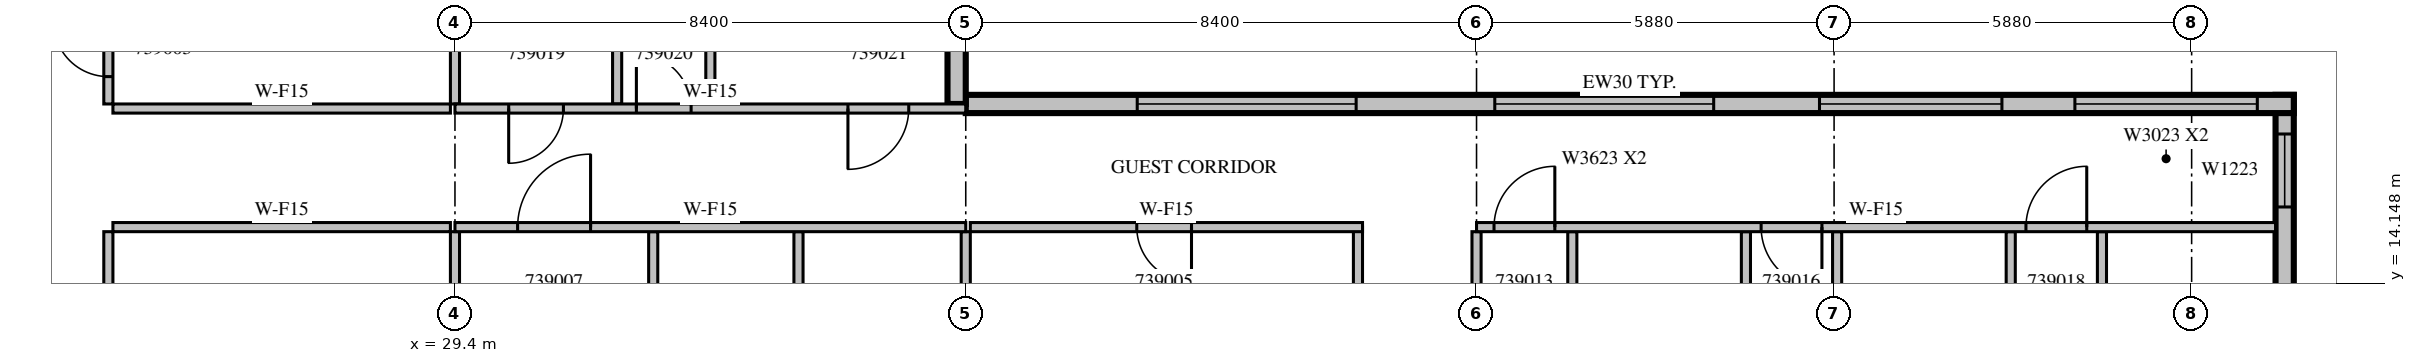
"""IFC4 building model, lengths in metres.
Left out: names, types, materials, properties, quantities, classifications, styles, units other than length and angle.
Written with IfcOpenShell. Run it as: python <this file> out.ifc"""

import sys

from ifc_helpers import new_model, si_unit, direction, frame, frame_2d, origin, place, context, subcontext, project, spatial, rectangle, extrude, source, transform, mapped, element, fill, save


model = new_model("IFC4")
c1 = context("Model", 3, precision=1e-05, world=origin(), true_north=direction((0.0, 1.0)))
c2 = subcontext(c1, "Body", "Model", "MODEL_VIEW")
j1 = project(units=[si_unit("LENGTHUNIT", "METRE"), si_unit("PLANEANGLEUNIT", "RADIAN")], contexts=[c1])
p1 = place(None, origin())
s1 = spatial("IfcSite", under=j1, at=p1, CompositionType="ELEMENT")
p2 = place(p1, origin())
s2 = spatial("IfcBuilding", under=s1, at=p2, CompositionType="ELEMENT")
p3 = place(p2, frame((0.0, 0.0, 181.6)))
s3 = spatial("IfcBuildingStorey", under=s2, at=p3, CompositionType="ELEMENT", Elevation=181.6)
m1 = source(origin(), c2, "Body", "SweptSolid", [
    extrude(rectangle(XDim=3.375, YDim=0.3, at=frame_2d((1.688, 0.0))), origin(), (0.0, 0.0, 1.0), 3.4),
])
p4 = place(p3, frame((59.49, 13.875, 0.0), z_axis=(0.0, 0.0, 1.0), x_axis=(0.0, 1.0, 0.0)))
e1 = element("IfcWall", 1, at=p4, inside=s3, PredefinedType="STANDARD", context=c2, shape_type="MappedRepresentation", body=[
    mapped(m1, transform((0.0, 0.0, 0.0), scale=1.0)),
])
m2 = source(origin(), c2, "Body", "SweptSolid", [
    extrude(rectangle(XDim=1.2, YDim=2.3, at=frame_2d((0.6, 1.15))), frame((0.0, 0.16, 0.0), z_axis=(0.0, -1.0, 0.0), x_axis=(1.0, 0.0, 0.0)), (0.0, 0.0, 1.0), 0.32),
])
p5 = place(p4, frame((1.531, 0.0, 0.6)))
e2 = element("IfcOpeningElement", 2, at=p5, cuts=e1, PredefinedType="OPENING", context=c2, shape_type="MappedRepresentation", body=[
    mapped(m2, transform((0.0, 0.0, 0.0), scale=1.0)),
])
m3 = source(origin(), c2, "Body", "SweptSolid", [
    extrude(rectangle(XDim=21.84, YDim=0.3, at=frame_2d((10.92, 0.0))), origin(), (0.0, 0.0, 1.0), 3.4),
])
p6 = place(p3, frame((59.64, 17.1, 0.0), z_axis=(0.0, 0.0, 1.0), x_axis=(-1.0, 0.0, 0.0)))
e3 = element("IfcWall", 3, at=p6, inside=s3, PredefinedType="STANDARD", context=c2, shape_type="MappedRepresentation", body=[
    mapped(m3, transform((0.0, 0.0, 0.0), scale=1.0)),
])
m4 = source(origin(), c2, "Body", "SweptSolid", [
    extrude(rectangle(XDim=3.0, YDim=2.3, at=frame_2d((1.5, 1.15))), frame((0.0, 0.16, 0.0), z_axis=(0.0, -1.0, 0.0), x_axis=(1.0, 0.0, 0.0)), (0.0, 0.0, 1.0), 0.32),
])
p7 = place(p6, frame((0.6, 0.0, 0.6)))
e4 = element("IfcOpeningElement", 4, at=p7, cuts=e3, PredefinedType="OPENING", context=c2, shape_type="MappedRepresentation", body=[
    mapped(m4, transform((0.0, 0.0, 0.0), scale=1.0)),
])
p8 = place(p6, frame((4.8, 0.0, 0.6)))
e5 = element("IfcOpeningElement", 5, at=p8, cuts=e3, PredefinedType="OPENING", context=c2, shape_type="MappedRepresentation", body=[
    mapped(m4, transform((0.0, 0.0, 0.0), scale=1.0)),
])
m5 = source(origin(), c2, "Body", "SweptSolid", [
    extrude(rectangle(XDim=3.6, YDim=2.3, at=frame_2d((1.8, 1.15))), frame((0.0, 0.16, 0.0), z_axis=(0.0, -1.0, 0.0), x_axis=(1.0, 0.0, 0.0)), (0.0, 0.0, 1.0), 0.32),
])
p9 = place(p6, frame((9.54, 0.0, 0.6)))
e6 = element("IfcOpeningElement", 6, at=p9, cuts=e3, PredefinedType="OPENING", context=c2, shape_type="MappedRepresentation", body=[
    mapped(m5, transform((0.0, 0.0, 0.0), scale=1.0)),
])
p10 = place(p6, frame((15.42, 0.0, 0.6)))
e7 = element("IfcOpeningElement", 7, at=p10, cuts=e3, PredefinedType="OPENING", context=c2, shape_type="MappedRepresentation", body=[
    mapped(m5, transform((0.0, 0.0, 0.0), scale=1.0)),
])
m6 = source(origin(), c2, "Body", "SweptSolid", [
    extrude(rectangle(XDim=3.0, YDim=0.3, at=frame_2d((1.5, 0.0))), origin(), (0.0, 0.0, 1.0), 3.4),
])
p11 = place(p3, frame((37.65, 17.1, 0.0), z_axis=(0.0, 0.0, 1.0), x_axis=(0.0, 1.0, 0.0)))
e8 = element("IfcWall", 8, at=p11, inside=s3, PredefinedType="STANDARD", context=c2, shape_type="MappedRepresentation", body=[
    mapped(m6, transform((0.0, 0.0, 0.0), scale=1.0)),
])
p12 = place(p11, frame((1.425, 0.0, 0.6)))
e9 = element("IfcOpeningElement", 9, at=p12, cuts=e8, PredefinedType="OPENING", context=c2, shape_type="MappedRepresentation", body=[
    mapped(m2, transform((0.0, 0.0, 0.0), scale=1.0)),
])
p13 = place(p3, frame((23.7, 15.0, 0.0), z_axis=(0.0, 0.0, 1.0), x_axis=(0.0, -1.0, 0.0)))
e10 = element("IfcWall", 10, at=p13, inside=s3, PredefinedType="PARTITIONING", context=c2, shape_type="SweptSolid", body=[
    extrude(rectangle(XDim=11.525, YDim=0.15, at=frame_2d((5.763, 0.0))), origin(), (0.0, 0.0, 1.0), 3.4),
])
m7 = source(origin(), c2, "Body", "SweptSolid", [
    extrude(rectangle(XDim=0.9, YDim=2.1, at=frame_2d((0.45, 1.05))), frame((0.0, 0.085, 0.0), z_axis=(0.0, -1.0, 0.0), x_axis=(1.0, 0.0, 0.0)), (0.0, 0.0, 1.0), 0.17),
])
p14 = place(p13, frame((9.363, 0.0, 0.0)))
e11 = element("IfcOpeningElement", 11, at=p14, cuts=e10, PredefinedType="OPENING", context=c2, shape_type="MappedRepresentation", body=[
    mapped(m7, transform((0.0, 0.0, 0.0), scale=1.0)),
])
p15 = place(p13, frame((2.725, 0.0, 0.0)))
e12 = element("IfcOpeningElement", 12, at=p15, cuts=e10, PredefinedType="OPENING", context=c2, shape_type="MappedRepresentation", body=[
    mapped(m7, transform((0.0, 0.0, 0.0), scale=1.0)),
])
m8 = source(origin(), c2, "Body", "SweptSolid", [
    extrude(rectangle(XDim=3.6, YDim=0.15, at=frame_2d((1.8, 0.0))), origin(), (0.0, 0.0, 1.0), 3.4),
])
p16 = place(p3, frame((23.7, 20.7, 0.0), z_axis=(0.0, 0.0, 1.0), x_axis=(0.0, -1.0, 0.0)))
e13 = element("IfcWall", 13, at=p16, inside=s3, PredefinedType="PARTITIONING", context=c2, shape_type="MappedRepresentation", body=[
    mapped(m8, transform((0.0, 0.0, 0.0), scale=1.0)),
])
p17 = place(p16, frame((2.25, 0.0, 0.0)))
e14 = element("IfcOpeningElement", 14, at=p17, cuts=e13, PredefinedType="OPENING", context=c2, shape_type="MappedRepresentation", body=[
    mapped(m7, transform((0.0, 0.0, 0.0), scale=1.0)),
])
m9 = source(origin(), c2, "Body", "SweptSolid", [
    extrude(rectangle(XDim=5.55, YDim=0.15, at=frame_2d((2.775, 0.0))), origin(), (0.0, 0.0, 1.0), 3.4),
])
for number, where, z_axis, x_axis in (
    (15, (29.325, 15.075, 0.0), (0.0, 0.0, 1.0), (-1.0, 0.0, 0.0)),
    (16, (23.775, 17.025, 0.0), (0.0, 0.0, 1.0), (1.0, 0.0, 0.0)),
):
    element("IfcWall", number, at=place(p3, frame(where, z_axis=z_axis, x_axis=x_axis)), inside=s3, PredefinedType="PARTITIONING", context=c2, shape_type="MappedRepresentation", body=[
        mapped(m9, transform((0.0, 0.0, 0.0), scale=1.0)),
    ])
m10 = source(origin(), c2, "Body", "SweptSolid", [
    extrude(rectangle(XDim=4.051, YDim=0.15, at=frame_2d((2.026, 0.0))), origin(), (0.0, 0.0, 1.0), 3.4),
])
p18 = place(p3, frame((29.4, 10.949, 0.0), z_axis=(0.0, 0.0, 1.0), x_axis=(0.0, 1.0, 0.0)))
e17 = element("IfcWall", 17, at=p18, inside=s3, PredefinedType="PARTITIONING", context=c2, shape_type="MappedRepresentation", body=[
    mapped(m10, transform((0.0, 0.0, 0.0), scale=1.0)),
])
m11 = source(origin(), c2, "Body", "SweptSolid", [
    extrude(rectangle(XDim=3.001, YDim=0.15, at=frame_2d((1.5, 0.0))), origin(), (0.0, 0.0, 1.0), 3.4),
])
p19 = place(p3, frame((29.4, 17.1, 0.0), z_axis=(0.0, 0.0, 1.0), x_axis=(0.0, 1.0, 0.0)))
e18 = element("IfcWall", 18, at=p19, inside=s3, PredefinedType="PARTITIONING", context=c2, shape_type="MappedRepresentation", body=[
    mapped(m11, transform((0.0, 0.0, 0.0), scale=1.0)),
])
m12 = source(origin(), c2, "Body", "SweptSolid", [
    extrude(rectangle(XDim=3.975, YDim=0.15, at=frame_2d((1.988, 0.0))), origin(), (0.0, 0.0, 1.0), 3.4),
])
p20 = place(p3, frame((44.25, 11.1, 0.0), z_axis=(0.0, 0.0, 1.0), x_axis=(0.0, 1.0, 0.0)))
e19 = element("IfcWall", 19, at=p20, inside=s3, PredefinedType="PARTITIONING", context=c2, shape_type="MappedRepresentation", body=[
    mapped(m12, transform((0.0, 0.0, 0.0), scale=1.0)),
])
m13 = source(origin(), c2, "Body", "SweptSolid", [
    extrude(rectangle(XDim=6.45, YDim=0.15, at=frame_2d((3.225, 0.0))), origin(), (0.0, 0.0, 1.0), 3.4),
])
p21 = place(p3, frame((44.325, 15.075, 0.0), z_axis=(0.0, 0.0, 1.0), x_axis=(-1.0, 0.0, 0.0)))
e20 = element("IfcWall", 20, at=p21, inside=s3, PredefinedType="PARTITIONING", context=c2, shape_type="MappedRepresentation", body=[
    mapped(m13, transform((0.0, 0.0, 0.0), scale=1.0)),
])
p22 = place(p21, frame((2.812, 0.0, 0.0)))
e21 = element("IfcOpeningElement", 21, at=p22, cuts=e20, PredefinedType="OPENING", context=c2, shape_type="MappedRepresentation", body=[
    mapped(m7, transform((0.0, 0.0, 0.0), scale=1.0)),
])
m14 = source(origin(), c2, "Body", "SweptSolid", [
    extrude(rectangle(XDim=3.9, YDim=0.15, at=frame_2d((1.95, 0.0))), origin(), (0.0, 0.0, 1.0), 3.4),
])
for number, where, z_axis, x_axis in (
    (22, (32.66, 11.1, 0.0), (0.0, 0.0, 1.0), (0.0, 1.0, 0.0)),
    (23, (35.049, 11.1, 0.0), (0.0, 0.0, 1.0), (0.0, 1.0, 0.0)),
    (24, (37.8, 11.1, 0.0), (0.0, 0.0, 1.0), (0.0, 1.0, 0.0)),
    (25, (47.775, 11.1, 0.0), (0.0, 0.0, 1.0), (0.0, 1.0, 0.0)),
    (26, (50.63, 11.1, 0.0), (0.0, 0.0, 1.0), (0.0, 1.0, 0.0)),
    (27, (52.13, 11.1, 0.0), (0.0, 0.0, 1.0), (0.0, 1.0, 0.0)),
    (28, (54.985, 11.1, 0.0), (0.0, 0.0, 1.0), (0.0, 1.0, 0.0)),
):
    element("IfcWall", number, at=place(p3, frame(where, z_axis=z_axis, x_axis=x_axis)), inside=s3, PredefinedType="PARTITIONING", context=c2, shape_type="MappedRepresentation", body=[
        mapped(m14, transform((0.0, 0.0, 0.0), scale=1.0)),
    ])
p23 = place(p3, frame((56.485, 11.1, 0.0), z_axis=(0.0, 0.0, 1.0), x_axis=(0.0, 1.0, 0.0)))
e29 = element("IfcWall", 29, at=p23, inside=s3, PredefinedType="PARTITIONING", context=c2, shape_type="MappedRepresentation", body=[
    mapped(m14, transform((0.0, 0.0, 0.0), scale=1.0)),
])
p24 = place(p23, frame((1.5, 0.0, 0.0)))
e30 = element("IfcOpeningElement", 30, at=p24, cuts=e29, PredefinedType="OPENING", context=c2, shape_type="MappedRepresentation", body=[
    mapped(m7, transform((0.0, 0.0, 0.0), scale=1.0)),
])
p25 = place(p3, frame((46.2, 11.1, 0.0), z_axis=(0.0, 0.0, 1.0), x_axis=(0.0, 1.0, 0.0)))
e31 = element("IfcWall", 31, at=p25, inside=s3, PredefinedType="PARTITIONING", context=c2, shape_type="MappedRepresentation", body=[
    mapped(m14, transform((0.0, 0.0, 0.0), scale=1.0)),
])
for number, where, z_axis, x_axis in (
    (32, (32.067, 20.7, 0.0), (0.0, 0.0, 1.0), (0.0, -1.0, 0.0)),
    (33, (33.6, 17.1, 0.0), (0.0, 0.0, 1.0), (0.0, 1.0, 0.0)),
):
    element("IfcWall", number, at=place(p3, frame(where, z_axis=z_axis, x_axis=x_axis)), inside=s3, PredefinedType="PARTITIONING", context=c2, shape_type="MappedRepresentation", body=[
        mapped(m8, transform((0.0, 0.0, 0.0), scale=1.0)),
    ])
m15 = source(origin(), c2, "Body", "SweptSolid", [
    extrude(rectangle(XDim=8.4, YDim=0.15, at=frame_2d((4.2, 0.0))), origin(), (0.0, 0.0, 1.0), 3.4),
])
p26 = place(p3, frame((37.8, 15.075, 0.0), z_axis=(0.0, 0.0, 1.0), x_axis=(-1.0, 0.0, 0.0)))
e34 = element("IfcWall", 34, at=p26, inside=s3, PredefinedType="PARTITIONING", context=c2, shape_type="MappedRepresentation", body=[
    mapped(m15, transform((0.0, 0.0, 0.0), scale=1.0)),
])
m16 = source(origin(), c2, "Body", "SweptSolid", [
    extrude(rectangle(XDim=1.2, YDim=2.1, at=frame_2d((0.6, 1.05))), frame((0.0, 0.085, 0.0), z_axis=(0.0, -1.0, 0.0), x_axis=(1.0, 0.0, 0.0)), (0.0, 0.0, 1.0), 0.17),
])
p27 = place(p26, frame((6.17, 0.0, 0.0)))
e35 = element("IfcOpeningElement", 35, at=p27, cuts=e34, PredefinedType="OPENING", context=c2, shape_type="MappedRepresentation", body=[
    mapped(m16, transform((0.0, 0.0, 0.0), scale=1.0)),
])
m17 = source(origin(), c2, "Body", "SweptSolid", [
    extrude(rectangle(XDim=13.14, YDim=0.15, at=frame_2d((6.57, 0.0))), origin(), (0.0, 0.0, 1.0), 3.4),
])
p28 = place(p3, frame((59.34, 15.075, 0.0), z_axis=(0.0, 0.0, 1.0), x_axis=(-1.0, 0.0, 0.0)))
e36 = element("IfcWall", 36, at=p28, inside=s3, PredefinedType="PARTITIONING", context=c2, shape_type="MappedRepresentation", body=[
    mapped(m17, transform((0.0, 0.0, 0.0), scale=1.0)),
])
m18 = source(origin(), c2, "Body", "SweptSolid", [
    extrude(rectangle(XDim=1.0, YDim=2.1, at=frame_2d((0.5, 1.05))), frame((0.0, 0.085, 0.0), z_axis=(0.0, -1.0, 0.0), x_axis=(1.0, 0.0, 0.0)), (0.0, 0.0, 1.0), 0.17),
])
p29 = place(p28, frame((11.852, 0.0, 0.0)))
e37 = element("IfcOpeningElement", 37, at=p29, cuts=e36, PredefinedType="OPENING", context=c2, shape_type="MappedRepresentation", body=[
    mapped(m18, transform((0.0, 0.0, 0.0), scale=1.0)),
])
p30 = place(p28, frame((7.46, 0.0, 0.0)))
e38 = element("IfcOpeningElement", 38, at=p30, cuts=e36, PredefinedType="OPENING", context=c2, shape_type="MappedRepresentation", body=[
    mapped(m18, transform((0.0, 0.0, 0.0), scale=1.0)),
])
p31 = place(p28, frame((3.105, 0.0, 0.0)))
e39 = element("IfcOpeningElement", 39, at=p31, cuts=e36, PredefinedType="OPENING", context=c2, shape_type="MappedRepresentation", body=[
    mapped(m18, transform((0.0, 0.0, 0.0), scale=1.0)),
])
p32 = place(p3, frame((29.4, 17.025, 0.0), z_axis=(0.0, 0.0, 1.0), x_axis=(1.0, 0.0, 0.0)))
e40 = element("IfcWall", 40, at=p32, inside=s3, PredefinedType="PARTITIONING", context=c2, shape_type="MappedRepresentation", body=[
    mapped(m15, transform((0.0, 0.0, 0.0), scale=1.0)),
])
p33 = place(p32, frame((0.883, 0.0, 0.0)))
e41 = element("IfcOpeningElement", 41, at=p33, cuts=e40, PredefinedType="OPENING", context=c2, shape_type="MappedRepresentation", body=[
    mapped(m7, transform((0.0, 0.0, 0.0), scale=1.0)),
])
p34 = place(p32, frame((2.983, 0.0, 0.0)))
e42 = element("IfcOpeningElement", 42, at=p34, cuts=e40, PredefinedType="OPENING", context=c2, shape_type="MappedRepresentation", body=[
    mapped(m7, transform((0.0, 0.0, 0.0), scale=1.0)),
])
p35 = place(p32, frame((6.463, 0.0, 0.0)))
e43 = element("IfcOpeningElement", 43, at=p35, cuts=e40, PredefinedType="OPENING", context=c2, shape_type="MappedRepresentation", body=[
    mapped(m18, transform((0.0, 0.0, 0.0), scale=1.0)),
])
m19 = source(origin(), c2, "Body", "SweptSolid", [
    extrude(rectangle(XDim=1.2, YDim=2.3, at=frame_2d((0.6, 1.15))), frame((0.0, 0.03, 0.0), z_axis=(0.0, -1.0, 0.0), x_axis=(1.0, 0.0, 0.0)), (0.0, 0.0, 1.0), 0.06),
])
p36 = place(p5, origin())
e44 = element("IfcWindow", 44, at=p36, inside=s3, PartitioningType="SINGLE_PANEL", PredefinedType="WINDOW", context=c2, shape_type="MappedRepresentation", body=[
    mapped(m19, transform((0.0, 0.0, 0.0), scale=1.0)),
])
fill(e2, e44)
m20 = source(origin(), c2, "Body", "SweptSolid", [
    extrude(rectangle(XDim=3.0, YDim=2.3, at=frame_2d((1.5, 1.15))), frame((0.0, 0.03, 0.0), z_axis=(0.0, -1.0, 0.0), x_axis=(1.0, 0.0, 0.0)), (0.0, 0.0, 1.0), 0.06),
])
p37 = place(p7, origin())
e45 = element("IfcWindow", 45, at=p37, inside=s3, PartitioningType="SINGLE_PANEL", PredefinedType="WINDOW", context=c2, shape_type="MappedRepresentation", body=[
    mapped(m20, transform((0.0, 0.0, 0.0), scale=1.0)),
])
fill(e4, e45)
p38 = place(p8, origin())
e46 = element("IfcWindow", 46, at=p38, inside=s3, PartitioningType="SINGLE_PANEL", PredefinedType="WINDOW", context=c2, shape_type="MappedRepresentation", body=[
    mapped(m20, transform((0.0, 0.0, 0.0), scale=1.0)),
])
fill(e5, e46)
m21 = source(origin(), c2, "Body", "SweptSolid", [
    extrude(rectangle(XDim=3.6, YDim=2.3, at=frame_2d((1.8, 1.15))), frame((0.0, 0.03, 0.0), z_axis=(0.0, -1.0, 0.0), x_axis=(1.0, 0.0, 0.0)), (0.0, 0.0, 1.0), 0.06),
])
p39 = place(p9, origin())
e47 = element("IfcWindow", 47, at=p39, inside=s3, PartitioningType="SINGLE_PANEL", PredefinedType="WINDOW", context=c2, shape_type="MappedRepresentation", body=[
    mapped(m21, transform((0.0, 0.0, 0.0), scale=1.0)),
])
fill(e6, e47)
p40 = place(p10, origin())
e48 = element("IfcWindow", 48, at=p40, inside=s3, PartitioningType="SINGLE_PANEL", PredefinedType="WINDOW", context=c2, shape_type="MappedRepresentation", body=[
    mapped(m21, transform((0.0, 0.0, 0.0), scale=1.0)),
])
fill(e7, e48)
m22 = source(origin(), c2, "Body", "SweptSolid", [
    extrude(rectangle(XDim=0.9, YDim=2.1, at=frame_2d((0.45, 1.05))), frame((0.0, 0.025, 0.0), z_axis=(0.0, -1.0, 0.0), x_axis=(1.0, 0.0, 0.0)), (0.0, 0.0, 1.0), 0.05),
])
p41 = place(p17, origin())
e49 = element("IfcDoor", 49, at=p41, inside=s3, OperationType="SINGLE_SWING_RIGHT", PredefinedType="DOOR", context=c2, shape_type="MappedRepresentation", body=[
    mapped(m22, transform((0.0, 0.0, 0.0), scale=1.0)),
])
fill(e14, e49)
p42 = place(p22, origin())
e50 = element("IfcDoor", 50, at=p42, inside=s3, OperationType="SINGLE_SWING_LEFT", PredefinedType="DOOR", context=c2, shape_type="MappedRepresentation", body=[
    mapped(m22, transform((0.0, 0.0, 0.0), scale=1.0)),
])
fill(e21, e50)
m23 = source(origin(), c2, "Body", "SweptSolid", [
    extrude(rectangle(XDim=1.2, YDim=2.1, at=frame_2d((0.6, 1.05))), frame((0.0, 0.025, 0.0), z_axis=(0.0, -1.0, 0.0), x_axis=(1.0, 0.0, 0.0)), (0.0, 0.0, 1.0), 0.05),
])
p43 = place(p27, origin())
e51 = element("IfcDoor", 51, at=p43, inside=s3, OperationType="SINGLE_SWING_RIGHT", PredefinedType="DOOR", context=c2, shape_type="MappedRepresentation", body=[
    mapped(m23, transform((0.0, 0.0, 0.0), scale=1.0)),
])
fill(e35, e51)
m24 = source(origin(), c2, "Body", "SweptSolid", [
    extrude(rectangle(XDim=1.0, YDim=2.1, at=frame_2d((0.5, 1.05))), frame((0.0, 0.025, 0.0), z_axis=(0.0, -1.0, 0.0), x_axis=(1.0, 0.0, 0.0)), (0.0, 0.0, 1.0), 0.05),
])
p44 = place(p29, origin())
e52 = element("IfcDoor", 52, at=p44, inside=s3, OperationType="SINGLE_SWING_RIGHT", PredefinedType="DOOR", context=c2, shape_type="MappedRepresentation", body=[
    mapped(m24, transform((0.0, 0.0, 0.0), scale=1.0)),
])
fill(e37, e52)
p45 = place(p30, origin())
e53 = element("IfcDoor", 53, at=p45, inside=s3, OperationType="SINGLE_SWING_LEFT", PredefinedType="DOOR", context=c2, shape_type="MappedRepresentation", body=[
    mapped(m24, transform((0.0, 0.0, 0.0), scale=1.0)),
])
fill(e38, e53)
p46 = place(p31, origin())
e54 = element("IfcDoor", 54, at=p46, inside=s3, OperationType="SINGLE_SWING_RIGHT", PredefinedType="DOOR", context=c2, shape_type="MappedRepresentation", body=[
    mapped(m24, transform((0.0, 0.0, 0.0), scale=1.0)),
])
fill(e39, e54)
p47 = place(p33, origin())
e55 = element("IfcDoor", 55, at=p47, inside=s3, OperationType="SINGLE_SWING_RIGHT", PredefinedType="DOOR", context=c2, shape_type="MappedRepresentation", body=[
    mapped(m22, transform((0.0, 0.0, 0.0), scale=1.0)),
])
fill(e41, e55)
p48 = place(p34, origin())
e56 = element("IfcDoor", 56, at=p48, inside=s3, OperationType="SINGLE_SWING_LEFT", PredefinedType="DOOR", context=c2, shape_type="MappedRepresentation", body=[
    mapped(m22, transform((0.0, 0.0, 0.0), scale=1.0)),
])
fill(e42, e56)
p49 = place(p35, origin())
e57 = element("IfcDoor", 57, at=p49, inside=s3, OperationType="SINGLE_SWING_RIGHT", PredefinedType="DOOR", context=c2, shape_type="MappedRepresentation", body=[
    mapped(m24, transform((0.0, 0.0, 0.0), scale=1.0)),
])
fill(e43, e57)
save(model, sys.argv[1])
